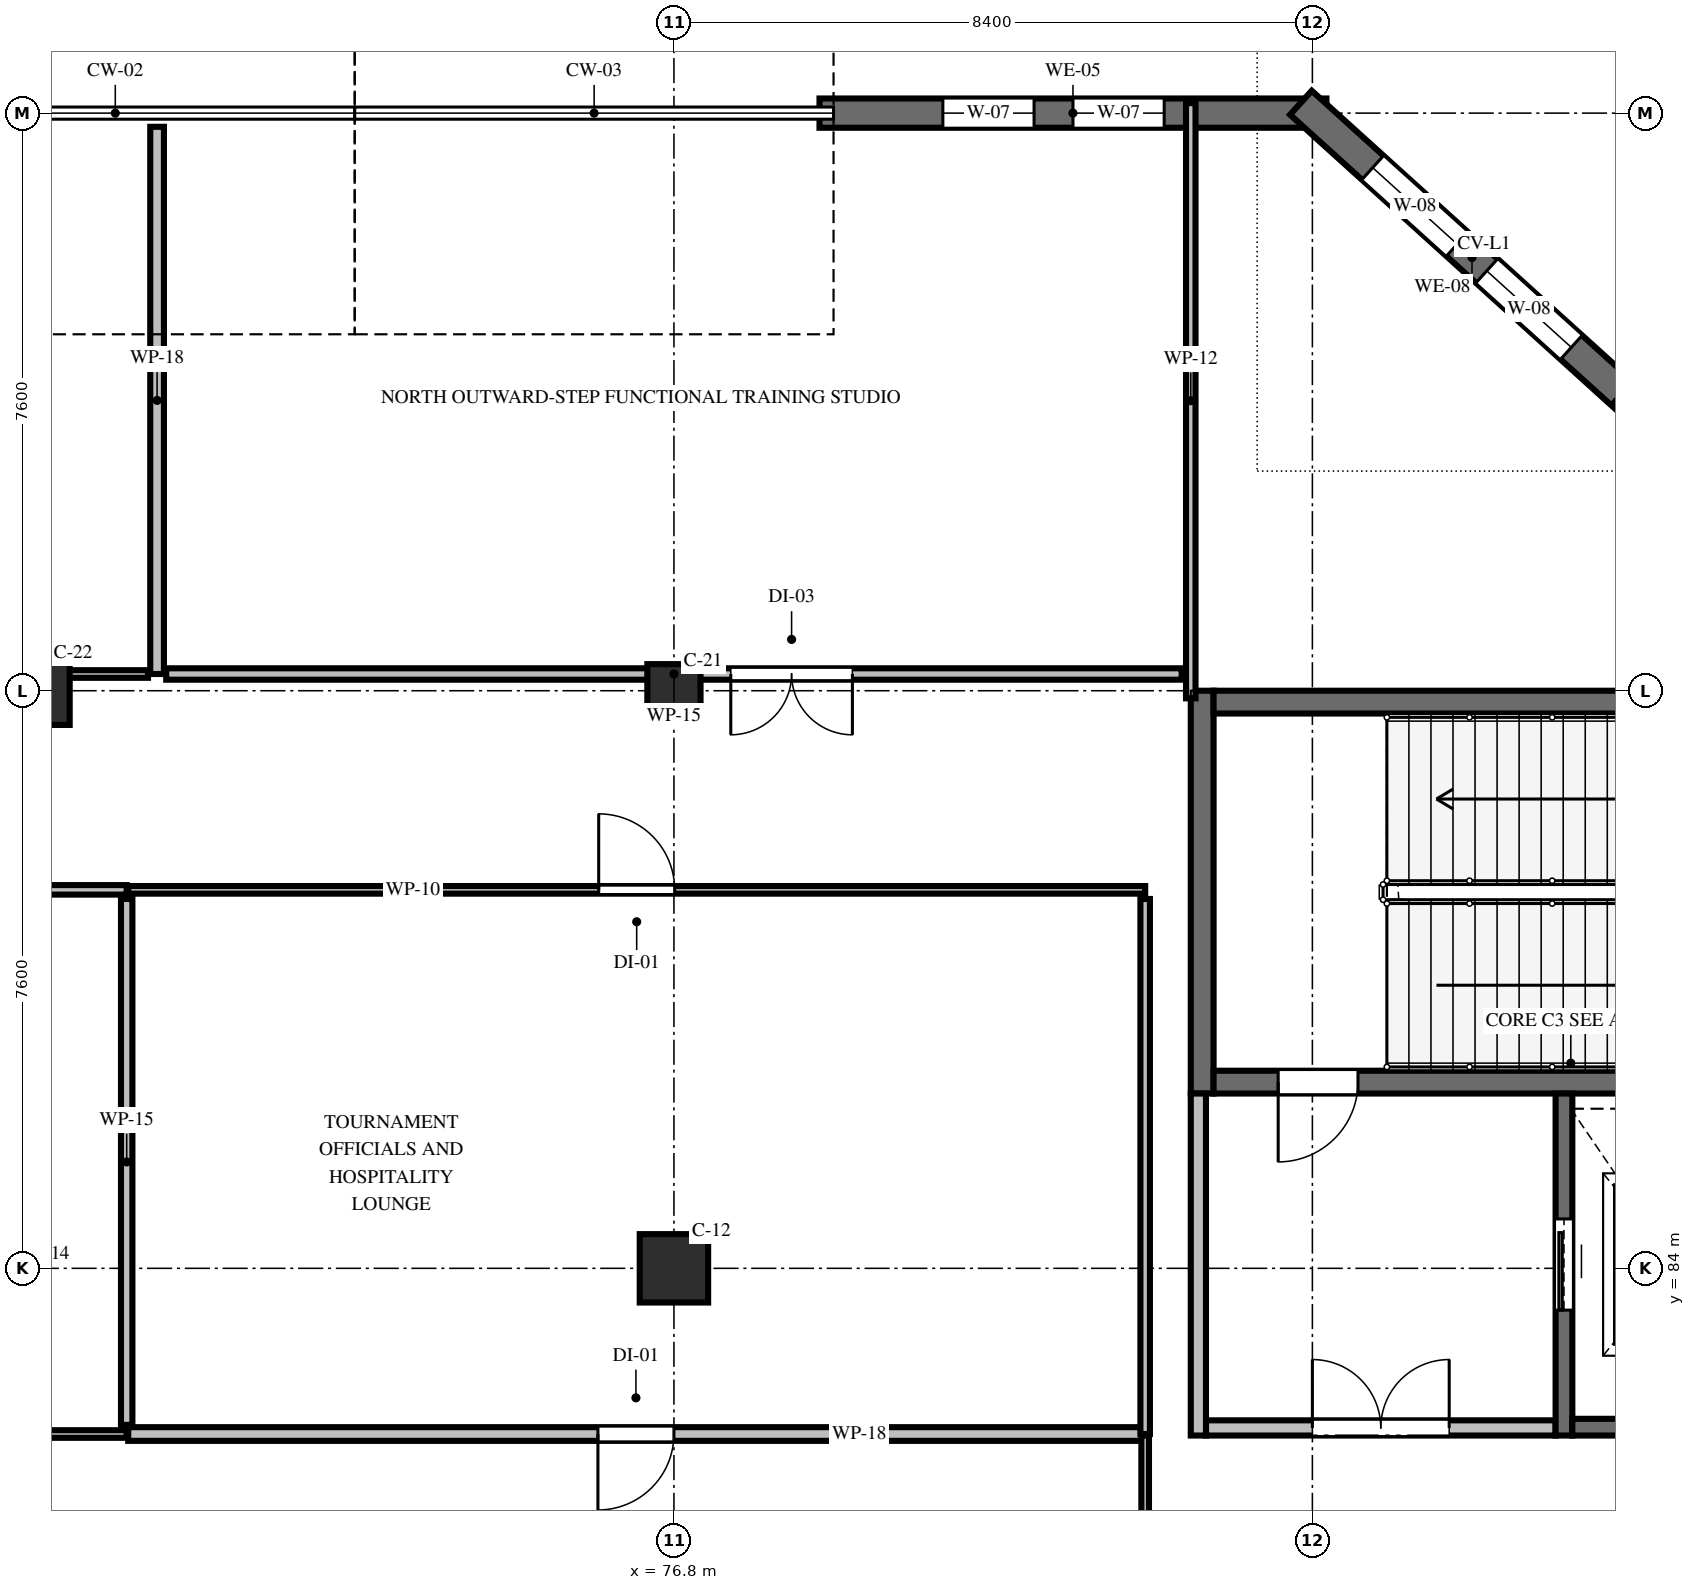
"""IFC4 building model, lengths in metres.
Left out: names, types, materials, properties, quantities, classifications, styles, units other than length and angle.
Written with IfcOpenShell. Run it as: python <this file> out.ifc"""

import sys

from ifc_helpers import new_model, si_unit, direction, frame, frame_2d, origin, origin_2d, place, context, subcontext, project, spatial, rectangle, hollow_rectangle, circle, extrude, element, fill, save


model = new_model("IFC4")
c1 = context("Model", 3, precision=1e-05, world=origin(), true_north=direction((0.0, 1.0)))
c2 = subcontext(c1, "Body", "Model", "MODEL_VIEW")
j1 = project(units=[si_unit("LENGTHUNIT", "METRE"), si_unit("PLANEANGLEUNIT", "RADIAN")], contexts=[c1])
p1 = place(None, origin())
s1 = spatial("IfcSite", under=j1, at=p1, CompositionType="ELEMENT")
p2 = place(p1, origin())
s2 = spatial("IfcBuilding", under=s1, at=p2, CompositionType="ELEMENT")
p3 = place(p2, frame((0.0, 0.0, 5.4)))
s3 = spatial("IfcBuildingStorey", under=s2, at=p3, CompositionType="ELEMENT", Elevation=5.4)
p4 = place(p3, frame((68.4, 91.6, 0.0), z_axis=(0.0, 0.0, 1.0), x_axis=(1.0, 0.0, 0.0)))
e1 = element("IfcColumn", 1, at=p4, inside=s3, PredefinedType="COLUMN", context=c2, shape_type="SweptSolid", body=[
    extrude(hollow_rectangle(XDim=0.9, YDim=0.9, WallThickness=0.036, InnerFilletRadius=0.036, OuterFilletRadius=0.072, at=origin_2d()), origin(), (0.0, 0.0, 1.0), 5.4),
])
p5 = place(p3, frame((76.8, 84.0, 0.0), z_axis=(0.0, 0.0, 1.0), x_axis=(1.0, 0.0, 0.0)))
e2 = element("IfcColumn", 2, at=p5, inside=s3, PredefinedType="COLUMN", context=c2, shape_type="SweptSolid", body=[
    extrude(circle(Radius=0.45, at=origin_2d()), origin(), (0.0, 0.0, 1.0), 5.4),
])
p6 = place(p3, frame((76.8, 91.6, 0.0), z_axis=(0.0, 0.0, 1.0), x_axis=(1.0, 0.0, 0.0)))
e3 = element("IfcColumn", 3, at=p6, inside=s3, PredefinedType="COLUMN", context=c2, shape_type="SweptSolid", body=[
    extrude(hollow_rectangle(XDim=0.7, YDim=0.7, WallThickness=0.028, InnerFilletRadius=0.028, OuterFilletRadius=0.056, at=origin_2d()), origin(), (0.0, 0.0, 1.0), 5.4),
])
p7 = place(p3, frame((78.715, 99.2, 0.0), z_axis=(0.0, 0.0, 1.0), x_axis=(1.0, 0.0, 0.0)))
e4 = element("IfcWall", 4, at=p7, inside=s3, PredefinedType="SOLIDWALL", context=c2, shape_type="SweptSolid", body=[
    extrude(rectangle(XDim=6.67, YDim=0.385, at=frame_2d((3.335, 0.0))), origin(), (0.0, 0.0, 1.0), 4.578),
])
p8 = place(p7, frame((1.623, 0.0, 0.9)))
e5 = element("IfcOpeningElement", 5, at=p8, cuts=e4, PredefinedType="OPENING", context=c2, shape_type="SweptSolid", body=[
    extrude(rectangle(XDim=1.2, YDim=1.5, at=frame_2d((0.6, 0.75))), frame((0.0, 0.202, 0.0), z_axis=(0.0, -1.0, 0.0), x_axis=(1.0, 0.0, 0.0)), (0.0, 0.0, 1.0), 0.405),
])
p9 = place(p7, frame((3.335, 0.0, 0.9)))
e6 = element("IfcOpeningElement", 6, at=p9, cuts=e4, PredefinedType="OPENING", context=c2, shape_type="SweptSolid", body=[
    extrude(rectangle(XDim=1.2, YDim=1.5, at=frame_2d((0.6, 0.75))), frame((0.0, 0.202, 0.0), z_axis=(0.0, -1.0, 0.0), x_axis=(1.0, 0.0, 0.0)), (0.0, 0.0, 1.0), 0.405),
])
p10 = place(p3, frame((85.049, 99.337, 0.0), z_axis=(0.0, 0.0, 1.0), x_axis=(0.741546257038, -0.670901742934, 0.0)))
e7 = element("IfcWall", 7, at=p10, inside=s3, PredefinedType="SOLIDWALL", context=c2, shape_type="SweptSolid", body=[
    extrude(rectangle(XDim=6.072, YDim=0.425, at=frame_2d((3.036, 0.0))), origin(), (0.0, 0.0, 1.0), 4.578),
])
p11 = place(p10, frame((1.274, 0.0, 0.9)))
e8 = element("IfcOpeningElement", 8, at=p11, cuts=e7, PredefinedType="OPENING", context=c2, shape_type="SweptSolid", body=[
    extrude(rectangle(XDim=1.5, YDim=1.5, at=frame_2d((0.75, 0.75))), frame((0.0, 0.222, 0.0), z_axis=(0.0, -1.0, 0.0), x_axis=(1.0, 0.0, 0.0)), (0.0, 0.0, 1.0), 0.445),
])
p12 = place(p10, frame((3.298, 0.0, 0.9)))
e9 = element("IfcOpeningElement", 9, at=p12, cuts=e7, PredefinedType="OPENING", context=c2, shape_type="SweptSolid", body=[
    extrude(rectangle(XDim=1.5, YDim=1.5, at=frame_2d((0.75, 0.75))), frame((0.0, 0.222, 0.0), z_axis=(0.0, -1.0, 0.0), x_axis=(1.0, 0.0, 0.0)), (0.0, 0.0, 1.0), 0.445),
])
p13 = place(p3, frame((89.277, 95.511, 0.0), z_axis=(0.0, 0.0, 1.0), x_axis=(0.741537713453, -0.670911186021, 0.0)))
e10 = element("IfcWall", 10, at=p13, inside=s3, PredefinedType="SOLIDWALL", context=c2, shape_type="SweptSolid", body=[
    extrude(rectangle(XDim=5.98, YDim=0.345, at=frame_2d((2.99, 0.0))), origin(), (0.0, 0.0, 1.0), 4.268),
])
p14 = place(p3, frame((83.75, 86.3, 0.0), z_axis=(0.0, 0.0, 1.0), x_axis=(0.0, 1.0, 0.0)))
e11 = element("IfcWall", 11, at=p14, inside=s3, PredefinedType="SHEAR", context=c2, shape_type="SweptSolid", body=[
    extrude(rectangle(XDim=5.3, YDim=0.3, at=frame_2d((2.65, 0.0))), origin(), (0.0, 0.0, 1.0), 4.98),
])
p15 = place(p3, frame((93.3, 86.45, 0.0), z_axis=(0.0, 0.0, 1.0), x_axis=(-1.0, 0.0, 0.0)))
e12 = element("IfcWall", 12, at=p15, inside=s3, PredefinedType="SHEAR", context=c2, shape_type="SweptSolid", body=[
    extrude(rectangle(XDim=9.4, YDim=0.3, at=frame_2d((4.7, 0.0))), origin(), (0.0, 0.0, 1.0), 4.98),
])
p16 = place(p15, frame((7.5, 0.0, 0.0)))
e13 = element("IfcOpeningElement", 13, at=p16, cuts=e12, PredefinedType="OPENING", context=c2, shape_type="SweptSolid", body=[
    extrude(rectangle(XDim=1.05, YDim=2.2, at=frame_2d((0.525, 1.1))), frame((0.0, 0.16, 0.0), z_axis=(0.0, -1.0, 0.0), x_axis=(1.0, 0.0, 0.0)), (0.0, 0.0, 1.0), 0.32),
])
p17 = place(p3, frame((83.9, 91.45, 0.0), z_axis=(0.0, 0.0, 1.0), x_axis=(1.0, 0.0, 0.0)))
e14 = element("IfcWall", 14, at=p17, inside=s3, PredefinedType="SHEAR", context=c2, shape_type="SweptSolid", body=[
    extrude(rectangle(XDim=9.4, YDim=0.3, at=frame_2d((4.7, 0.0))), origin(), (0.0, 0.0, 1.0), 4.98),
])
p18 = place(p3, frame((83.8, 81.9, 0.0), z_axis=(0.0, 0.0, 1.0), x_axis=(1.0, 0.0, 0.0)))
e15 = element("IfcWall", 15, at=p18, inside=s3, PredefinedType="SOLIDWALL", context=c2, shape_type="SweptSolid", body=[
    extrude(rectangle(XDim=4.6, YDim=0.2, at=frame_2d((2.3, 0.0))), origin(), (0.0, 0.0, 1.0), 4.27),
])
p19 = place(p18, frame((1.4, 0.0, 0.0)))
e16 = element("IfcOpeningElement", 16, at=p19, cuts=e15, PredefinedType="OPENING", context=c2, shape_type="SweptSolid", body=[
    extrude(rectangle(XDim=1.8, YDim=2.2, at=frame_2d((0.9, 1.1))), frame((0.0, 0.11, 0.0), z_axis=(0.0, -1.0, 0.0), x_axis=(1.0, 0.0, 0.0)), (0.0, 0.0, 1.0), 0.22),
])
p20 = place(p3, frame((83.7, 81.8, 0.0), z_axis=(0.0, 0.0, 1.0), x_axis=(0.0, 1.0, 0.0)))
e17 = element("IfcWall", 17, at=p20, inside=s3, PredefinedType="SOLIDWALL", context=c2, shape_type="SweptSolid", body=[
    extrude(rectangle(XDim=4.5, YDim=0.2, at=frame_2d((2.25, 0.0))), origin(), (0.0, 0.0, 1.0), 4.27),
])
p21 = place(p3, frame((88.51, 81.8, 0.0), z_axis=(0.0, 0.0, 1.0), x_axis=(0.0, 1.0, 0.0)))
e18 = element("IfcWall", 18, at=p21, inside=s3, PredefinedType="SOLIDWALL", context=c2, shape_type="SweptSolid", body=[
    extrude(rectangle(XDim=4.5, YDim=0.22, at=frame_2d((2.25, 0.0))), origin(), (0.0, 0.0, 1.0), 4.98),
])
p22 = place(p21, frame((1.65, 0.0, 0.0)))
e19 = element("IfcOpeningElement", 19, at=p22, cuts=e18, PredefinedType="OPENING", context=c2, shape_type="SweptSolid", body=[
    extrude(rectangle(XDim=1.2, YDim=2.2, at=frame_2d((0.6, 1.1))), frame((0.0, 0.12, 0.0), z_axis=(0.0, -1.0, 0.0), x_axis=(1.0, 0.0, 0.0)), (0.0, 0.0, 1.0), 0.24),
])
p23 = place(p3, frame((88.62, 81.91, 0.0), z_axis=(0.0, 0.0, 1.0), x_axis=(1.0, 0.0, 0.0)))
e20 = element("IfcWall", 20, at=p23, inside=s3, PredefinedType="SOLIDWALL", context=c2, shape_type="SweptSolid", body=[
    extrude(rectangle(XDim=2.76, YDim=0.22, at=frame_2d((1.38, 0.0))), origin(), (0.0, 0.0, 1.0), 4.98),
])
p24 = place(p3, frame((70.0, 99.02, 0.0), z_axis=(0.0, 0.0, 1.0), x_axis=(0.0, -1.0, 0.0)))
e21 = element("IfcWall", 21, at=p24, inside=s3, PredefinedType="PARTITIONING", context=c2, shape_type="SweptSolid", body=[
    extrude(rectangle(XDim=7.2, YDim=0.18, at=frame_2d((3.6, 0.0))), origin(), (0.0, 0.0, 1.0), 4.47),
])
p25 = place(p3, frame((69.88, 91.82, 0.0), z_axis=(0.0, 0.0, 1.0), x_axis=(-1.0, 0.0, 0.0)))
e22 = element("IfcWall", 22, at=p25, inside=s3, PredefinedType="PARTITIONING", context=c2, shape_type="SweptSolid", body=[
    extrude(rectangle(XDim=15.76, YDim=0.1, at=frame_2d((7.88, 0.0))), origin(), (0.0, 0.0, 1.0), 4.12),
])
p26 = place(p25, frame((7.08, 0.0, 0.0)))
e23 = element("IfcOpeningElement", 23, at=p26, cuts=e22, PredefinedType="OPENING", context=c2, shape_type="SweptSolid", body=[
    extrude(rectangle(XDim=1.6, YDim=2.2, at=frame_2d((0.8, 1.1))), frame((0.0, 0.06, 0.0), z_axis=(0.0, -1.0, 0.0), x_axis=(1.0, 0.0, 0.0)), (0.0, 0.0, 1.0), 0.12),
])
p27 = place(p3, frame((83.6, 99.332, 0.0), z_axis=(0.0, 0.0, 1.0), x_axis=(0.0, -1.0, 0.0)))
e24 = element("IfcWall", 24, at=p27, inside=s3, PredefinedType="PARTITIONING", context=c2, shape_type="SweptSolid", body=[
    extrude(rectangle(XDim=7.832, YDim=0.125, at=frame_2d((3.916, 0.0))), origin(), (0.0, 0.0, 1.0), 4.58),
])
p28 = place(p3, frame((83.48, 91.82, 0.0), z_axis=(0.0, 0.0, 1.0), x_axis=(-1.0, 0.0, 0.0)))
e25 = element("IfcWall", 25, at=p28, inside=s3, PredefinedType="PARTITIONING", context=c2, shape_type="SweptSolid", body=[
    extrude(rectangle(XDim=13.36, YDim=0.15, at=frame_2d((6.68, 0.0))), origin(), (0.0, 0.0, 1.0), 4.47),
])
p29 = place(p28, frame((4.332, 0.0, 0.0)))
e26 = element("IfcOpeningElement", 26, at=p29, cuts=e25, PredefinedType="OPENING", context=c2, shape_type="SweptSolid", body=[
    extrude(rectangle(XDim=1.6, YDim=2.2, at=frame_2d((0.8, 1.1))), frame((0.0, 0.085, 0.0), z_axis=(0.0, -1.0, 0.0), x_axis=(1.0, 0.0, 0.0)), (0.0, 0.0, 1.0), 0.17),
])
p30 = place(p3, frame((69.6, 81.82, 0.0), z_axis=(0.0, 0.0, 1.0), x_axis=(-1.0, 0.0, 0.0)))
e27 = element("IfcWall", 27, at=p30, inside=s3, PredefinedType="PARTITIONING", context=c2, shape_type="SweptSolid", body=[
    extrude(rectangle(XDim=13.98, YDim=0.1, at=frame_2d((6.99, 0.0))), origin(), (0.0, 0.0, 1.0), 4.37),
])
p31 = place(p30, frame((6.49, 0.0, 0.0)))
e28 = element("IfcOpeningElement", 28, at=p31, cuts=e27, PredefinedType="OPENING", context=c2, shape_type="SweptSolid", body=[
    extrude(rectangle(XDim=1.0, YDim=2.15, at=frame_2d((0.5, 1.075))), frame((0.0, 0.06, 0.0), z_axis=(0.0, -1.0, 0.0), x_axis=(1.0, 0.0, 0.0)), (0.0, 0.0, 1.0), 0.12),
])
p32 = place(p3, frame((55.62, 88.98, 0.0), z_axis=(0.0, 0.0, 1.0), x_axis=(1.0, 0.0, 0.0)))
e29 = element("IfcWall", 29, at=p32, inside=s3, PredefinedType="PARTITIONING", context=c2, shape_type="SweptSolid", body=[
    extrude(rectangle(XDim=13.98, YDim=0.125, at=frame_2d((6.99, 0.0))), origin(), (0.0, 0.0, 1.0), 4.278),
])
p33 = place(p32, frame((6.49, 0.0, 0.0)))
e30 = element("IfcOpeningElement", 30, at=p33, cuts=e29, PredefinedType="OPENING", context=c2, shape_type="SweptSolid", body=[
    extrude(rectangle(XDim=1.0, YDim=2.15, at=frame_2d((0.5, 1.075))), frame((0.0, 0.073, 0.0), z_axis=(0.0, -1.0, 0.0), x_axis=(1.0, 0.0, 0.0)), (0.0, 0.0, 1.0), 0.145),
])
p34 = place(p3, frame((69.6, 88.86, 0.0), z_axis=(0.0, 0.0, 1.0), x_axis=(0.0, -1.0, 0.0)))
e31 = element("IfcWall", 31, at=p34, inside=s3, PredefinedType="PARTITIONING", context=c2, shape_type="SweptSolid", body=[
    extrude(rectangle(XDim=6.92, YDim=0.15, at=frame_2d((3.46, 0.0))), origin(), (0.0, 0.0, 1.0), 4.08),
])
p35 = place(p3, frame((82.98, 81.82, 0.0), z_axis=(0.0, 0.0, 1.0), x_axis=(-1.0, 0.0, 0.0)))
e32 = element("IfcWall", 32, at=p35, inside=s3, PredefinedType="PARTITIONING", context=c2, shape_type="SweptSolid", body=[
    extrude(rectangle(XDim=13.36, YDim=0.18, at=frame_2d((6.68, 0.0))), origin(), (0.0, 0.0, 1.0), 4.17),
])
p36 = place(p35, frame((6.18, 0.0, 0.0)))
e33 = element("IfcOpeningElement", 33, at=p36, cuts=e32, PredefinedType="OPENING", context=c2, shape_type="SweptSolid", body=[
    extrude(rectangle(XDim=1.0, YDim=2.15, at=frame_2d((0.5, 1.075))), frame((0.0, 0.1, 0.0), z_axis=(0.0, -1.0, 0.0), x_axis=(1.0, 0.0, 0.0)), (0.0, 0.0, 1.0), 0.2),
])
p37 = place(p3, frame((69.62, 88.98, 0.0), z_axis=(0.0, 0.0, 1.0), x_axis=(1.0, 0.0, 0.0)))
e34 = element("IfcWall", 34, at=p37, inside=s3, PredefinedType="PARTITIONING", context=c2, shape_type="SweptSolid", body=[
    extrude(rectangle(XDim=13.38, YDim=0.1, at=frame_2d((6.69, 0.0))), origin(), (0.0, 0.0, 1.0), 4.08),
])
p38 = place(p37, frame((6.19, 0.0, 0.0)))
e35 = element("IfcOpeningElement", 35, at=p38, cuts=e34, PredefinedType="OPENING", context=c2, shape_type="SweptSolid", body=[
    extrude(rectangle(XDim=1.0, YDim=2.15, at=frame_2d((0.5, 1.075))), frame((0.0, 0.06, 0.0), z_axis=(0.0, -1.0, 0.0), x_axis=(1.0, 0.0, 0.0)), (0.0, 0.0, 1.0), 0.12),
])
p39 = place(p3, frame((83.0, 88.86, 0.0), z_axis=(0.0, 0.0, 1.0), x_axis=(0.0, -1.0, 0.0)))
e36 = element("IfcWall", 36, at=p39, inside=s3, PredefinedType="PARTITIONING", context=c2, shape_type="SweptSolid", body=[
    extrude(rectangle(XDim=7.04, YDim=0.125, at=frame_2d((3.52, 0.0))), origin(), (0.0, 0.0, 1.0), 4.98),
])
p40 = place(p3, frame((83.0, 34.72, 0.0), z_axis=(0.0, 0.0, 1.0), x_axis=(0.0, 1.0, 0.0)))
e37 = element("IfcWall", 37, at=p40, inside=s3, PredefinedType="PARTITIONING", context=c2, shape_type="SweptSolid", body=[
    extrude(rectangle(XDim=47.08, YDim=0.1, at=frame_2d((23.54, 0.0))), origin(), (0.0, 0.0, 1.0), 3.47),
])
p41 = place(p40, frame((43.787, 0.0, 0.0)))
e38 = element("IfcOpeningElement", 38, at=p41, cuts=e37, PredefinedType="OPENING", context=c2, shape_type="SweptSolid", body=[
    extrude(rectangle(XDim=1.6, YDim=2.2, at=frame_2d((0.8, 1.1))), frame((0.0, 0.06, 0.0), z_axis=(0.0, -1.0, 0.0), x_axis=(1.0, 0.0, 0.0)), (0.0, 0.0, 1.0), 0.12),
])
p42 = place(p8, origin())
e39 = element("IfcWindow", 39, at=p42, inside=s3, PartitioningType="DOUBLE_PANEL_VERTICAL", PredefinedType="WINDOW", context=c2, shape_type="SweptSolid", body=[
    extrude(rectangle(XDim=1.2, YDim=1.5, at=frame_2d((0.6, 0.75))), frame((0.0, 0.03, 0.0), z_axis=(0.0, -1.0, 0.0), x_axis=(1.0, 0.0, 0.0)), (0.0, 0.0, 1.0), 0.06),
])
fill(e5, e39)
p43 = place(p9, origin())
e40 = element("IfcWindow", 40, at=p43, inside=s3, PartitioningType="DOUBLE_PANEL_VERTICAL", PredefinedType="WINDOW", context=c2, shape_type="SweptSolid", body=[
    extrude(rectangle(XDim=1.2, YDim=1.5, at=frame_2d((0.6, 0.75))), frame((0.0, 0.03, 0.0), z_axis=(0.0, -1.0, 0.0), x_axis=(1.0, 0.0, 0.0)), (0.0, 0.0, 1.0), 0.06),
])
fill(e6, e40)
p44 = place(p11, origin())
e41 = element("IfcWindow", 41, at=p44, inside=s3, PartitioningType="DOUBLE_PANEL_VERTICAL", PredefinedType="WINDOW", context=c2, shape_type="SweptSolid", body=[
    extrude(rectangle(XDim=1.5, YDim=1.5, at=frame_2d((0.75, 0.75))), frame((0.0, 0.03, 0.0), z_axis=(0.0, -1.0, 0.0), x_axis=(1.0, 0.0, 0.0)), (0.0, 0.0, 1.0), 0.06),
])
fill(e8, e41)
p45 = place(p12, origin())
e42 = element("IfcWindow", 42, at=p45, inside=s3, PartitioningType="DOUBLE_PANEL_VERTICAL", PredefinedType="WINDOW", context=c2, shape_type="SweptSolid", body=[
    extrude(rectangle(XDim=1.5, YDim=1.5, at=frame_2d((0.75, 0.75))), frame((0.0, 0.03, 0.0), z_axis=(0.0, -1.0, 0.0), x_axis=(1.0, 0.0, 0.0)), (0.0, 0.0, 1.0), 0.06),
])
fill(e9, e42)
p46 = place(p16, origin())
e43 = element("IfcDoor", 43, at=p46, inside=s3, OperationType="SINGLE_SWING_RIGHT", PredefinedType="DOOR", context=c2, shape_type="SweptSolid", body=[
    extrude(rectangle(XDim=1.05, YDim=2.2, at=frame_2d((0.525, 1.1))), frame((0.0, 0.025, 0.0), z_axis=(0.0, -1.0, 0.0), x_axis=(1.0, 0.0, 0.0)), (0.0, 0.0, 1.0), 0.05),
])
fill(e13, e43)
p47 = place(p19, origin())
e44 = element("IfcDoor", 44, at=p47, inside=s3, OperationType="DOUBLE_DOOR_SINGLE_SWING", PredefinedType="DOOR", context=c2, shape_type="SweptSolid", body=[
    extrude(rectangle(XDim=1.8, YDim=2.2, at=frame_2d((0.9, 1.1))), frame((0.0, 0.025, 0.0), z_axis=(0.0, -1.0, 0.0), x_axis=(1.0, 0.0, 0.0)), (0.0, 0.0, 1.0), 0.05),
])
fill(e16, e44)
p48 = place(p22, origin())
e45 = element("IfcDoor", 45, at=p48, inside=s3, OperationType="SLIDING_TO_LEFT", PredefinedType="DOOR", context=c2, shape_type="SweptSolid", body=[
    extrude(rectangle(XDim=1.2, YDim=2.2, at=frame_2d((0.6, 1.1))), frame((0.0, 0.025, 0.0), z_axis=(0.0, -1.0, 0.0), x_axis=(1.0, 0.0, 0.0)), (0.0, 0.0, 1.0), 0.05),
])
fill(e19, e45)
p49 = place(p38, origin())
e46 = element("IfcDoor", 46, at=p49, inside=s3, OperationType="SINGLE_SWING_LEFT", PredefinedType="DOOR", context=c2, shape_type="SweptSolid", body=[
    extrude(rectangle(XDim=1.0, YDim=2.15, at=frame_2d((0.5, 1.075))), frame((0.0, 0.025, 0.0), z_axis=(0.0, -1.0, 0.0), x_axis=(1.0, 0.0, 0.0)), (0.0, 0.0, 1.0), 0.05),
])
fill(e35, e46)
p50 = place(p36, origin())
e47 = element("IfcDoor", 47, at=p50, inside=s3, OperationType="SINGLE_SWING_RIGHT", PredefinedType="DOOR", context=c2, shape_type="SweptSolid", body=[
    extrude(rectangle(XDim=1.0, YDim=2.15, at=frame_2d((0.5, 1.075))), frame((0.0, 0.025, 0.0), z_axis=(0.0, -1.0, 0.0), x_axis=(1.0, 0.0, 0.0)), (0.0, 0.0, 1.0), 0.05),
])
fill(e33, e47)
p51 = place(p29, origin())
e48 = element("IfcDoor", 48, at=p51, inside=s3, OperationType="DOUBLE_DOOR_SINGLE_SWING", PredefinedType="DOOR", context=c2, shape_type="SweptSolid", body=[
    extrude(rectangle(XDim=1.6, YDim=2.2, at=frame_2d((0.8, 1.1))), frame((0.0, 0.025, 0.0), z_axis=(0.0, -1.0, 0.0), x_axis=(1.0, 0.0, 0.0)), (0.0, 0.0, 1.0), 0.05),
])
fill(e26, e48)
save(model, sys.argv[1])
